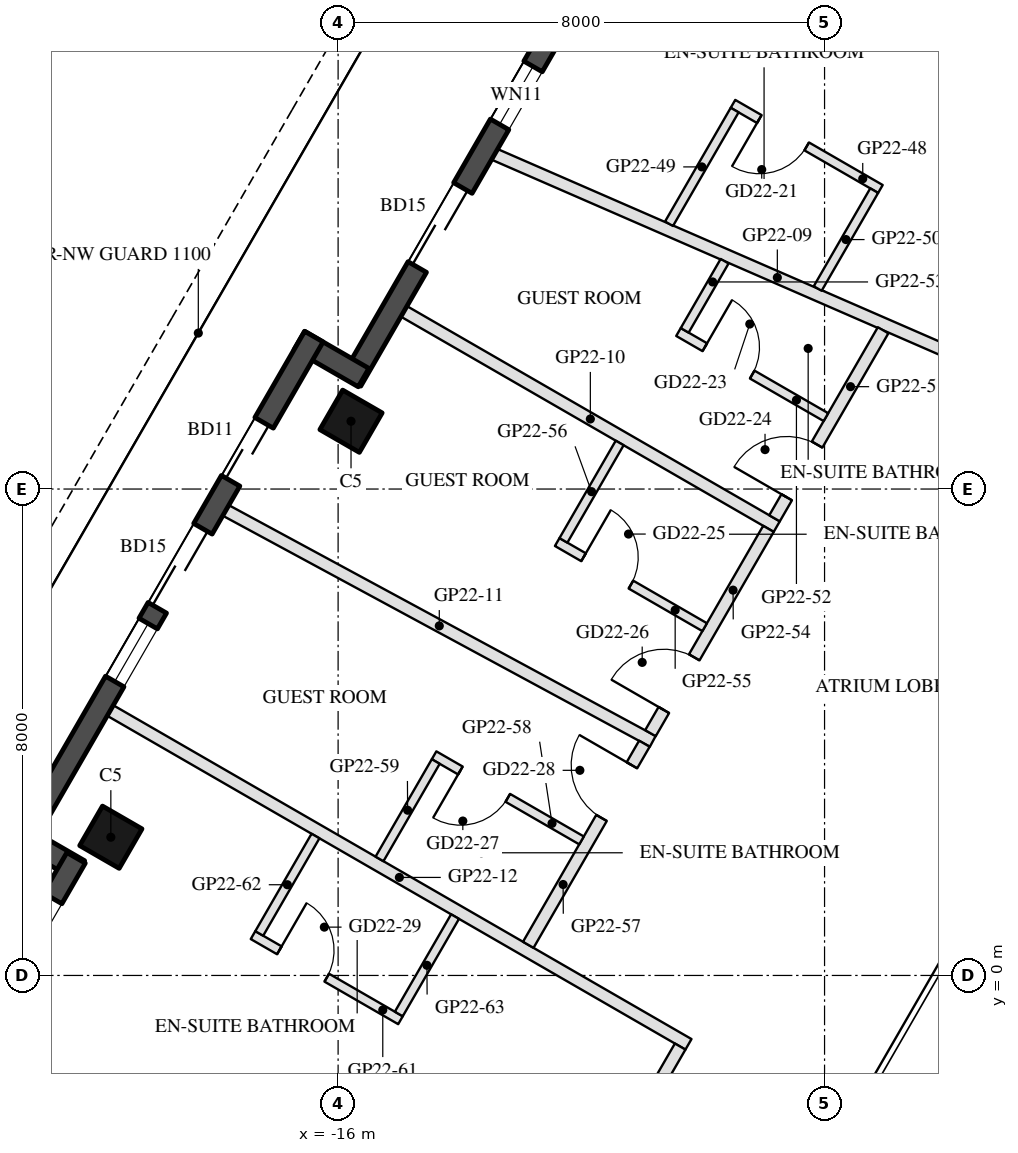
"""IFC4 building model, lengths in metres.
Left out: names, types, materials, properties, quantities, classifications, styles, units other than length and angle.
Written with IfcOpenShell. Run it as: python <this file> out.ifc"""

import sys

from ifc_helpers import new_model, si_unit, direction, frame, frame_2d, origin, origin_2d, place, context, subcontext, project, spatial, rectangle, hollow_rectangle, extrude, element, fill, save


model = new_model("IFC4")
c1 = context("Model", 3, precision=1e-05, world=origin(), true_north=direction((0.0, 1.0)))
c2 = subcontext(c1, "Body", "Model", "MODEL_VIEW")
j1 = project(units=[si_unit("LENGTHUNIT", "METRE"), si_unit("PLANEANGLEUNIT", "RADIAN")], contexts=[c1])
p1 = place(None, origin())
s1 = spatial("IfcSite", under=j1, at=p1, CompositionType="ELEMENT")
p2 = place(p1, origin())
s2 = spatial("IfcBuilding", under=s1, at=p2, CompositionType="ELEMENT")
p3 = place(p2, frame((0.0, 0.0, 224.3)))
s3 = spatial("IfcBuildingStorey", under=s2, at=p3, CompositionType="ELEMENT", Elevation=224.3)
for number, where, z_axis, x_axis in (
    (1, (-15.788, 9.115, 0.0), (0.0, 0.0, 1.0), (0.5, 0.866, 0.0)),
    (2, (-19.738, 2.273, 0.0), (0.0, 0.0, 1.0), (0.5, 0.866, 0.0)),
):
    element("IfcColumn", number, at=place(p3, frame(where, z_axis=z_axis, x_axis=x_axis)), inside=s3, PredefinedType="COLUMN", context=c2, shape_type="SweptSolid", body=[
        extrude(hollow_rectangle(XDim=0.75, YDim=0.75, WallThickness=0.035, at=origin_2d()), origin(), (0.0, 0.0, 1.0), 3.7),
    ])
p4 = place(p3, frame((-12.409, 15.617, 0.0), z_axis=(0.0, 0.0, 1.0), x_axis=(-0.500003597184, -0.866023326939, 0.0)))
e3 = element("IfcWall", 3, at=p4, inside=s3, PredefinedType="SOLIDWALL", context=c2, shape_type="SweptSolid", body=[
    extrude(rectangle(XDim=6.74, YDim=0.35, at=frame_2d((3.37, 0.0))), origin(), (0.0, 0.0, 1.0), 3.55),
])
p5 = place(p4, frame((0.77, 0.0, 0.3)))
e4 = element("IfcOpeningElement", 4, at=p5, cuts=e3, PredefinedType="OPENING", context=c2, shape_type="SweptSolid", body=[
    extrude(rectangle(XDim=1.1, YDim=2.65, at=frame_2d((0.55, 1.325))), frame((0.0, 0.185, 0.0), z_axis=(0.0, -1.0, 0.0), x_axis=(1.0, 0.0, 0.0)), (0.0, 0.0, 1.0), 0.37),
])
p6 = place(p4, frame((3.079, 0.0, 0.0)))
e5 = element("IfcOpeningElement", 5, at=p6, cuts=e3, PredefinedType="OPENING", context=c2, shape_type="SweptSolid", body=[
    extrude(rectangle(XDim=1.5, YDim=2.4, at=frame_2d((0.75, 1.2))), frame((0.0, 0.185, 0.0), z_axis=(0.0, -1.0, 0.0), x_axis=(1.0, 0.0, 0.0)), (0.0, 0.0, 1.0), 0.37),
])
p7 = place(p3, frame((-15.581, 9.833, 0.0), z_axis=(0.0, 0.0, 1.0), x_axis=(-0.866055662726, 0.499947586314, 0.0)))
e6 = element("IfcWall", 6, at=p7, inside=s3, PredefinedType="SOLIDWALL", context=c2, shape_type="SweptSolid", body=[
    extrude(rectangle(XDim=1.22, YDim=0.35, at=frame_2d((0.61, 0.0))), origin(), (0.0, 0.0, 1.0), 3.55),
])
p8 = place(p3, frame((-16.398, 10.507, 0.0), z_axis=(0.0, 0.0, 1.0), x_axis=(-0.499999142773, -0.866025898704, 0.0)))
e7 = element("IfcWall", 7, at=p8, inside=s3, PredefinedType="SOLIDWALL", context=c2, shape_type="SweptSolid", body=[
    extrude(rectangle(XDim=9.7, YDim=0.35, at=frame_2d((4.85, 0.0))), origin(), (0.0, 0.0, 1.0), 3.55),
])
p9 = place(p8, frame((1.638, 0.0, 0.0)))
e8 = element("IfcOpeningElement", 8, at=p9, cuts=e7, PredefinedType="OPENING", context=c2, shape_type="SweptSolid", body=[
    extrude(rectangle(XDim=1.1, YDim=2.4, at=frame_2d((0.55, 1.2))), frame((0.0, 0.185, 0.0), z_axis=(0.0, -1.0, 0.0), x_axis=(1.0, 0.0, 0.0)), (0.0, 0.0, 1.0), 0.37),
])
p10 = place(p8, frame((3.65, 0.0, 0.0)))
e9 = element("IfcOpeningElement", 9, at=p10, cuts=e7, PredefinedType="OPENING", context=c2, shape_type="SweptSolid", body=[
    extrude(rectangle(XDim=1.5, YDim=2.4, at=frame_2d((0.75, 1.2))), frame((0.0, 0.185, 0.0), z_axis=(0.0, -1.0, 0.0), x_axis=(1.0, 0.0, 0.0)), (0.0, 0.0, 1.0), 0.37),
])
p11 = place(p8, frame((5.45, 0.0, 0.3)))
e10 = element("IfcOpeningElement", 10, at=p11, cuts=e7, PredefinedType="OPENING", context=c2, shape_type="SweptSolid", body=[
    extrude(rectangle(XDim=1.1, YDim=2.65, at=frame_2d((0.55, 1.325))), frame((0.0, 0.185, 0.0), z_axis=(0.0, -1.0, 0.0), x_axis=(1.0, 0.0, 0.0)), (0.0, 0.0, 1.0), 0.37),
])
p12 = place(p3, frame((-21.312, 2.346, 0.0), z_axis=(0.0, 0.0, 1.0), x_axis=(0.866005645448, -0.500034220881, 0.0)))
e11 = element("IfcWall", 11, at=p12, inside=s3, PredefinedType="SOLIDWALL", context=c2, shape_type="SweptSolid", body=[
    extrude(rectangle(XDim=1.22, YDim=0.35, at=frame_2d((0.61, 0.0))), origin(), (0.0, 0.0, 1.0), 3.55),
])
p13 = place(p3, frame((-20.309, 1.934, 0.0), z_axis=(0.0, 0.0, 1.0), x_axis=(-0.499992114976, -0.866029956157, 0.0)))
e12 = element("IfcWall", 12, at=p13, inside=s3, PredefinedType="SOLIDWALL", context=c2, shape_type="SweptSolid", body=[
    extrude(rectangle(XDim=6.74, YDim=0.35, at=frame_2d((3.37, 0.0))), origin(), (0.0, 0.0, 1.0), 3.55),
])
p14 = place(p13, frame((4.02, 0.0, 0.0)))
e13 = element("IfcOpeningElement", 13, at=p14, cuts=e12, PredefinedType="OPENING", context=c2, shape_type="SweptSolid", body=[
    extrude(rectangle(XDim=2.4, YDim=2.4, at=frame_2d((1.2, 1.2))), frame((0.0, 0.185, 0.0), z_axis=(0.0, -1.0, 0.0), x_axis=(1.0, 0.0, 0.0)), (0.0, 0.0, 1.0), 0.37),
])
p15 = place(p13, frame((0.77, 0.0, 0.3)))
e14 = element("IfcOpeningElement", 14, at=p15, cuts=e12, PredefinedType="OPENING", context=c2, shape_type="SweptSolid", body=[
    extrude(rectangle(XDim=2.9, YDim=2.65, at=frame_2d((1.45, 1.325))), frame((0.0, 0.185, 0.0), z_axis=(0.0, -1.0, 0.0), x_axis=(1.0, 0.0, 0.0)), (0.0, 0.0, 1.0), 0.37),
])
p16 = place(p3, frame((-13.427, 13.504, 0.0), z_axis=(0.0, 0.0, 1.0), x_axis=(0.916759471343, -0.399439697204, 0.0)))
e15 = element("IfcWall", 15, at=p16, inside=s3, PredefinedType="PARTITIONING", context=c2, shape_type="SweptSolid", body=[
    extrude(rectangle(XDim=10.144, YDim=0.2, at=frame_2d((5.072, 0.0))), origin(), (0.0, 0.0, 1.0), 3.06),
])
p17 = place(p3, frame((-14.917, 10.922, 0.0), z_axis=(0.0, 0.0, 1.0), x_axis=(0.866019052629, -0.500011000363, 0.0)))
e16 = element("IfcWall", 16, at=p17, inside=s3, PredefinedType="PARTITIONING", context=c2, shape_type="SweptSolid", body=[
    extrude(rectangle(XDim=7.08, YDim=0.2, at=frame_2d((3.54, 0.0))), origin(), (0.0, 0.0, 1.0), 3.06),
])
p18 = place(p3, frame((-17.847, 7.648, 0.0), z_axis=(0.0, 0.0, 1.0), x_axis=(0.879604495132, -0.475705720109, 0.0)))
e17 = element("IfcWall", 17, at=p18, inside=s3, PredefinedType="PARTITIONING", context=c2, shape_type="SweptSolid", body=[
    extrude(rectangle(XDim=7.983, YDim=0.2, at=frame_2d((3.992, 0.0))), origin(), (0.0, 0.0, 1.0), 3.06),
])
p19 = place(p3, frame((-19.747, 4.357, 0.0), z_axis=(0.0, 0.0, 1.0), x_axis=(0.866027479907, -0.499996404033, 0.0)))
e18 = element("IfcWall", 18, at=p19, inside=s3, PredefinedType="PARTITIONING", context=c2, shape_type="SweptSolid", body=[
    extrude(rectangle(XDim=10.98, YDim=0.2, at=frame_2d((5.49, 0.0))), origin(), (0.0, 0.0, 1.0), 3.06),
])
p20 = place(p3, frame((-7.081, 12.935, 0.0), z_axis=(0.0, 0.0, 1.0), x_axis=(-0.866056369097, 0.49994636267, 0.0)))
e19 = element("IfcWall", 19, at=p20, inside=s3, PredefinedType="PARTITIONING", context=c2, shape_type="SweptSolid", body=[
    extrude(rectangle(XDim=2.8, YDim=0.15, at=frame_2d((1.4, 0.0))), origin(), (0.0, 0.0, 1.0), 3.55),
])
p21 = place(p20, frame((1.4, 0.0, 0.0)))
e20 = element("IfcOpeningElement", 20, at=p21, cuts=e19, PredefinedType="OPENING", context=c2, shape_type="SweptSolid", body=[
    extrude(rectangle(XDim=0.9, YDim=2.1, at=frame_2d((0.45, 1.05))), frame((0.0, 0.085, 0.0), z_axis=(0.0, -1.0, 0.0), x_axis=(1.0, 0.0, 0.0)), (0.0, 0.0, 1.0), 0.17),
])
p22 = place(p3, frame((-9.479, 14.233, 0.0), z_axis=(0.0, 0.0, 1.0), x_axis=(-0.499983569942, -0.866034889475, 0.0)))
e21 = element("IfcWall", 21, at=p22, inside=s3, PredefinedType="PARTITIONING", context=c2, shape_type="SweptSolid", body=[
    extrude(rectangle(XDim=2.158, YDim=0.15, at=frame_2d((1.079, 0.0))), origin(), (0.0, 0.0, 1.0), 3.55),
])
p23 = place(p3, frame((-7.184, 12.908, 0.0), z_axis=(0.0, 0.0, 1.0), x_axis=(-0.49995366312, -0.866052154742, 0.0)))
e22 = element("IfcWall", 22, at=p23, inside=s3, PredefinedType="PARTITIONING", context=c2, shape_type="SweptSolid", body=[
    extrude(rectangle(XDim=1.859, YDim=0.15, at=frame_2d((0.929, 0.0))), origin(), (0.0, 0.0, 1.0), 3.55),
])
p24 = place(p3, frame((-8.823, 7.519, 0.0), z_axis=(0.0, 0.0, 1.0), x_axis=(0.500036104519, 0.866004557827, 0.0)))
e23 = element("IfcWall", 23, at=p24, inside=s3, PredefinedType="PARTITIONING", context=c2, shape_type="SweptSolid", body=[
    extrude(rectangle(XDim=3.571, YDim=0.2, at=frame_2d((1.786, 0.0))), origin(), (0.0, 0.0, 1.0), 2.95),
])
p25 = place(p24, frame((0.4, 0.0, 0.0)))
e24 = element("IfcOpeningElement", 24, at=p25, cuts=e23, PredefinedType="OPENING", context=c2, shape_type="SweptSolid", body=[
    extrude(rectangle(XDim=1.0, YDim=2.1, at=frame_2d((0.5, 1.05))), frame((0.0, 0.11, 0.0), z_axis=(0.0, -1.0, 0.0), x_axis=(1.0, 0.0, 0.0)), (0.0, 0.0, 1.0), 0.22),
])
p26 = place(p3, frame((-10.402, 10.583, 0.0), z_axis=(0.0, 0.0, 1.0), x_axis=(0.866034573852, -0.49998411664, 0.0)))
e25 = element("IfcWall", 25, at=p26, inside=s3, PredefinedType="PARTITIONING", context=c2, shape_type="SweptSolid", body=[
    extrude(rectangle(XDim=2.8, YDim=0.15, at=frame_2d((1.4, 0.0))), origin(), (0.0, 0.0, 1.0), 2.95),
])
p27 = place(p26, frame((0.5, 0.0, 0.0)))
e26 = element("IfcOpeningElement", 26, at=p27, cuts=e25, PredefinedType="OPENING", context=c2, shape_type="SweptSolid", body=[
    extrude(rectangle(XDim=0.9, YDim=2.1, at=frame_2d((0.45, 1.05))), frame((0.0, 0.085, 0.0), z_axis=(0.0, -1.0, 0.0), x_axis=(1.0, 0.0, 0.0)), (0.0, 0.0, 1.0), 0.17),
])
p28 = place(p3, frame((-9.644, 11.747, 0.0), z_axis=(0.0, 0.0, 1.0), x_axis=(-0.499899541988, -0.866083395476, 0.0)))
e27 = element("IfcWall", 27, at=p28, inside=s3, PredefinedType="PARTITIONING", context=c2, shape_type="SweptSolid", body=[
    extrude(rectangle(XDim=1.313, YDim=0.15, at=frame_2d((0.656, 0.0))), origin(), (0.0, 0.0, 1.0), 2.95),
])
p29 = place(p3, frame((-10.863, 3.985, 0.0), z_axis=(0.0, 0.0, 1.0), x_axis=(0.500009256921, 0.866020059232, 0.0)))
e28 = element("IfcWall", 28, at=p29, inside=s3, PredefinedType="PARTITIONING", context=c2, shape_type="SweptSolid", body=[
    extrude(rectangle(XDim=3.881, YDim=0.2, at=frame_2d((1.94, 0.0))), origin(), (0.0, 0.0, 1.0), 2.95),
])
p30 = place(p29, frame((0.44, 0.0, 0.0)))
e29 = element("IfcOpeningElement", 29, at=p30, cuts=e28, PredefinedType="OPENING", context=c2, shape_type="SweptSolid", body=[
    extrude(rectangle(XDim=1.0, YDim=2.1, at=frame_2d((0.5, 1.05))), frame((0.0, 0.11, 0.0), z_axis=(0.0, -1.0, 0.0), x_axis=(1.0, 0.0, 0.0)), (0.0, 0.0, 1.0), 0.22),
])
p31 = place(p3, frame((-12.397, 7.128, 0.0), z_axis=(0.0, 0.0, 1.0), x_axis=(0.866018616679, -0.500011755427, 0.0)))
e30 = element("IfcWall", 30, at=p31, inside=s3, PredefinedType="PARTITIONING", context=c2, shape_type="SweptSolid", body=[
    extrude(rectangle(XDim=2.8, YDim=0.15, at=frame_2d((1.4, 0.0))), origin(), (0.0, 0.0, 1.0), 2.95),
])
p32 = place(p31, frame((0.5, 0.0, 0.0)))
e31 = element("IfcOpeningElement", 31, at=p32, cuts=e30, PredefinedType="OPENING", context=c2, shape_type="SweptSolid", body=[
    extrude(rectangle(XDim=0.9, YDim=2.1, at=frame_2d((0.45, 1.05))), frame((0.0, 0.085, 0.0), z_axis=(0.0, -1.0, 0.0), x_axis=(1.0, 0.0, 0.0)), (0.0, 0.0, 1.0), 0.17),
])
p33 = place(p3, frame((-11.369, 8.758, 0.0), z_axis=(0.0, 0.0, 1.0), x_axis=(-0.500042316284, -0.866000971088, 0.0)))
e32 = element("IfcWall", 32, at=p33, inside=s3, PredefinedType="PARTITIONING", context=c2, shape_type="SweptSolid", body=[
    extrude(rectangle(XDim=1.85, YDim=0.15, at=frame_2d((0.925, 0.0))), origin(), (0.0, 0.0, 1.0), 2.95),
])
p34 = place(p3, frame((-12.873, 0.504, 0.0), z_axis=(0.0, 0.0, 1.0), x_axis=(0.500030487836, 0.866007800909, 0.0)))
e33 = element("IfcWall", 33, at=p34, inside=s3, PredefinedType="PARTITIONING", context=c2, shape_type="SweptSolid", body=[
    extrude(rectangle(XDim=3.819, YDim=0.2, at=frame_2d((1.91, 0.0))), origin(), (0.0, 0.0, 1.0), 2.95),
])
p35 = place(p34, frame((2.41, 0.0, 0.0)))
e34 = element("IfcOpeningElement", 34, at=p35, cuts=e33, PredefinedType="OPENING", context=c2, shape_type="SweptSolid", body=[
    extrude(rectangle(XDim=1.0, YDim=2.1, at=frame_2d((0.5, 1.05))), frame((0.0, 0.11, 0.0), z_axis=(0.0, -1.0, 0.0), x_axis=(1.0, 0.0, 0.0)), (0.0, 0.0, 1.0), 0.22),
])
p36 = place(p3, frame((-11.997, 2.221, 0.0), z_axis=(0.0, 0.0, 1.0), x_axis=(-0.866034573852, 0.49998411664, 0.0)))
e35 = element("IfcWall", 35, at=p36, inside=s3, PredefinedType="PARTITIONING", context=c2, shape_type="SweptSolid", body=[
    extrude(rectangle(XDim=2.8, YDim=0.15, at=frame_2d((1.4, 0.0))), origin(), (0.0, 0.0, 1.0), 2.95),
])
p37 = place(p36, frame((1.4, 0.0, 0.0)))
e36 = element("IfcOpeningElement", 36, at=p37, cuts=e35, PredefinedType="OPENING", context=c2, shape_type="SweptSolid", body=[
    extrude(rectangle(XDim=0.9, YDim=2.1, at=frame_2d((0.45, 1.05))), frame((0.0, 0.085, 0.0), z_axis=(0.0, -1.0, 0.0), x_axis=(1.0, 0.0, 0.0)), (0.0, 0.0, 1.0), 0.17),
])
p38 = place(p3, frame((-14.394, 3.519, 0.0), z_axis=(0.0, 0.0, 1.0), x_axis=(-0.499886193382, -0.866091100096, 0.0)))
e37 = element("IfcWall", 37, at=p38, inside=s3, PredefinedType="PARTITIONING", context=c2, shape_type="SweptSolid", body=[
    extrude(rectangle(XDim=1.85, YDim=0.15, at=frame_2d((0.925, 0.0))), origin(), (0.0, 0.0, 1.0), 3.55),
])
p39 = place(p3, frame((-12.269, -4.45, 0.0), z_axis=(0.0, 0.0, 1.0), x_axis=(0.500055316652, 0.865993464345, 0.0)))
e38 = element("IfcWall", 38, at=p39, inside=s3, PredefinedType="PARTITIONING", context=c2, shape_type="SweptSolid", body=[
    extrude(rectangle(XDim=3.788, YDim=0.2, at=frame_2d((1.894, 0.0))), origin(), (0.0, 0.0, 1.0), 2.95),
])
p40 = place(p39, frame((1.394, 0.0, 0.0)))
e39 = element("IfcOpeningElement", 39, at=p40, cuts=e38, PredefinedType="OPENING", context=c2, shape_type="SweptSolid", body=[
    extrude(rectangle(XDim=1.0, YDim=2.1, at=frame_2d((0.5, 1.05))), frame((0.0, 0.11, 0.0), z_axis=(0.0, -1.0, 0.0), x_axis=(1.0, 0.0, 0.0)), (0.0, 0.0, 1.0), 0.22),
])
p41 = place(p3, frame((-17.399, 0.664, 0.0), z_axis=(0.0, 0.0, 1.0), x_axis=(0.866018616679, -0.500011755427, 0.0)))
e40 = element("IfcWall", 40, at=p41, inside=s3, PredefinedType="PARTITIONING", context=c2, shape_type="SweptSolid", body=[
    extrude(rectangle(XDim=2.8, YDim=0.15, at=frame_2d((1.4, 0.0))), origin(), (0.0, 0.0, 1.0), 3.55),
])
p42 = place(p41, frame((0.5, 0.0, 0.0)))
e41 = element("IfcOpeningElement", 41, at=p42, cuts=e40, PredefinedType="OPENING", context=c2, shape_type="SweptSolid", body=[
    extrude(rectangle(XDim=0.9, YDim=2.1, at=frame_2d((0.45, 1.05))), frame((0.0, 0.085, 0.0), z_axis=(0.0, -1.0, 0.0), x_axis=(1.0, 0.0, 0.0)), (0.0, 0.0, 1.0), 0.17),
])
p43 = place(p3, frame((-16.372, 2.293, 0.0), z_axis=(0.0, 0.0, 1.0), x_axis=(-0.499985172903, -0.866033964044, 0.0)))
e42 = element("IfcWall", 42, at=p43, inside=s3, PredefinedType="PARTITIONING", context=c2, shape_type="SweptSolid", body=[
    extrude(rectangle(XDim=1.85, YDim=0.15, at=frame_2d((0.925, 0.0))), origin(), (0.0, 0.0, 1.0), 2.95),
])
p44 = place(p3, frame((-14.077, 0.968, 0.0), z_axis=(0.0, 0.0, 1.0), x_axis=(-0.500042316284, -0.866000971088, 0.0)))
e43 = element("IfcWall", 43, at=p44, inside=s3, PredefinedType="PARTITIONING", context=c2, shape_type="SweptSolid", body=[
    extrude(rectangle(XDim=1.85, YDim=0.15, at=frame_2d((0.925, 0.0))), origin(), (0.0, 0.0, 1.0), 2.95),
])
p45 = place(p5, origin())
e44 = element("IfcWindow", 44, at=p45, inside=s3, PartitioningType="SINGLE_PANEL", PredefinedType="WINDOW", context=c2, shape_type="SweptSolid", body=[
    extrude(rectangle(XDim=1.1, YDim=2.65, at=frame_2d((0.55, 1.325))), frame((0.0, 0.03, 0.0), z_axis=(0.0, -1.0, 0.0), x_axis=(1.0, 0.0, 0.0)), (0.0, 0.0, 1.0), 0.06),
])
fill(e4, e44)
p46 = place(p6, frame((1.5, 0.0, 0.0), z_axis=(0.0, 0.0, 1.0), x_axis=(-1.0, 0.0, 0.0)))
e45 = element("IfcDoor", 45, at=p46, inside=s3, OperationType="SLIDING_TO_LEFT", PredefinedType="DOOR", context=c2, shape_type="SweptSolid", body=[
    extrude(rectangle(XDim=1.5, YDim=2.4, at=frame_2d((0.75, 1.2))), frame((0.0, 0.025, 0.0), z_axis=(0.0, -1.0, 0.0), x_axis=(1.0, 0.0, 0.0)), (0.0, 0.0, 1.0), 0.05),
])
fill(e5, e45)
p47 = place(p9, frame((1.1, 0.0, 0.0), z_axis=(0.0, 0.0, 1.0), x_axis=(-1.0, 0.0, 0.0)))
e46 = element("IfcDoor", 46, at=p47, inside=s3, OperationType="SLIDING_TO_LEFT", PredefinedType="DOOR", context=c2, shape_type="SweptSolid", body=[
    extrude(rectangle(XDim=1.1, YDim=2.4, at=frame_2d((0.55, 1.2))), frame((0.0, 0.025, 0.0), z_axis=(0.0, -1.0, 0.0), x_axis=(1.0, 0.0, 0.0)), (0.0, 0.0, 1.0), 0.05),
])
fill(e8, e46)
p48 = place(p10, frame((1.5, 0.0, 0.0), z_axis=(0.0, 0.0, 1.0), x_axis=(-1.0, 0.0, 0.0)))
e47 = element("IfcDoor", 47, at=p48, inside=s3, OperationType="SLIDING_TO_LEFT", PredefinedType="DOOR", context=c2, shape_type="SweptSolid", body=[
    extrude(rectangle(XDim=1.5, YDim=2.4, at=frame_2d((0.75, 1.2))), frame((0.0, 0.025, 0.0), z_axis=(0.0, -1.0, 0.0), x_axis=(1.0, 0.0, 0.0)), (0.0, 0.0, 1.0), 0.05),
])
fill(e9, e47)
p49 = place(p11, origin())
e48 = element("IfcWindow", 48, at=p49, inside=s3, PartitioningType="SINGLE_PANEL", PredefinedType="WINDOW", context=c2, shape_type="SweptSolid", body=[
    extrude(rectangle(XDim=1.1, YDim=2.65, at=frame_2d((0.55, 1.325))), frame((0.0, 0.03, 0.0), z_axis=(0.0, -1.0, 0.0), x_axis=(1.0, 0.0, 0.0)), (0.0, 0.0, 1.0), 0.06),
])
fill(e10, e48)
p50 = place(p15, origin())
e49 = element("IfcWindow", 49, at=p50, inside=s3, PartitioningType="SINGLE_PANEL", PredefinedType="WINDOW", context=c2, shape_type="SweptSolid", body=[
    extrude(rectangle(XDim=2.9, YDim=2.65, at=frame_2d((1.45, 1.325))), frame((0.0, 0.03, 0.0), z_axis=(0.0, -1.0, 0.0), x_axis=(1.0, 0.0, 0.0)), (0.0, 0.0, 1.0), 0.06),
])
fill(e14, e49)
p51 = place(p21, origin())
e50 = element("IfcDoor", 50, at=p51, inside=s3, OperationType="SINGLE_SWING_RIGHT", PredefinedType="DOOR", context=c2, shape_type="SweptSolid", body=[
    extrude(rectangle(XDim=0.9, YDim=2.1, at=frame_2d((0.45, 1.05))), frame((0.0, 0.025, 0.0), z_axis=(0.0, -1.0, 0.0), x_axis=(1.0, 0.0, 0.0)), (0.0, 0.0, 1.0), 0.05),
])
fill(e20, e50)
p52 = place(p27, origin())
e51 = element("IfcDoor", 51, at=p52, inside=s3, OperationType="SINGLE_SWING_LEFT", PredefinedType="DOOR", context=c2, shape_type="SweptSolid", body=[
    extrude(rectangle(XDim=0.9, YDim=2.1, at=frame_2d((0.45, 1.05))), frame((0.0, 0.025, 0.0), z_axis=(0.0, -1.0, 0.0), x_axis=(1.0, 0.0, 0.0)), (0.0, 0.0, 1.0), 0.05),
])
fill(e26, e51)
p53 = place(p25, origin())
e52 = element("IfcDoor", 52, at=p53, inside=s3, OperationType="SINGLE_SWING_LEFT", PredefinedType="DOOR", context=c2, shape_type="SweptSolid", body=[
    extrude(rectangle(XDim=1.0, YDim=2.1, at=frame_2d((0.5, 1.05))), frame((0.0, 0.025, 0.0), z_axis=(0.0, -1.0, 0.0), x_axis=(1.0, 0.0, 0.0)), (0.0, 0.0, 1.0), 0.05),
])
fill(e24, e52)
p54 = place(p32, origin())
e53 = element("IfcDoor", 53, at=p54, inside=s3, OperationType="SINGLE_SWING_LEFT", PredefinedType="DOOR", context=c2, shape_type="SweptSolid", body=[
    extrude(rectangle(XDim=0.9, YDim=2.1, at=frame_2d((0.45, 1.05))), frame((0.0, 0.025, 0.0), z_axis=(0.0, -1.0, 0.0), x_axis=(1.0, 0.0, 0.0)), (0.0, 0.0, 1.0), 0.05),
])
fill(e31, e53)
p55 = place(p30, origin())
e54 = element("IfcDoor", 54, at=p55, inside=s3, OperationType="SINGLE_SWING_LEFT", PredefinedType="DOOR", context=c2, shape_type="SweptSolid", body=[
    extrude(rectangle(XDim=1.0, YDim=2.1, at=frame_2d((0.5, 1.05))), frame((0.0, 0.025, 0.0), z_axis=(0.0, -1.0, 0.0), x_axis=(1.0, 0.0, 0.0)), (0.0, 0.0, 1.0), 0.05),
])
fill(e29, e54)
p56 = place(p37, origin())
e55 = element("IfcDoor", 55, at=p56, inside=s3, OperationType="SINGLE_SWING_RIGHT", PredefinedType="DOOR", context=c2, shape_type="SweptSolid", body=[
    extrude(rectangle(XDim=0.9, YDim=2.1, at=frame_2d((0.45, 1.05))), frame((0.0, 0.025, 0.0), z_axis=(0.0, -1.0, 0.0), x_axis=(1.0, 0.0, 0.0)), (0.0, 0.0, 1.0), 0.05),
])
fill(e36, e55)
p57 = place(p35, origin())
e56 = element("IfcDoor", 56, at=p57, inside=s3, OperationType="SINGLE_SWING_RIGHT", PredefinedType="DOOR", context=c2, shape_type="SweptSolid", body=[
    extrude(rectangle(XDim=1.0, YDim=2.1, at=frame_2d((0.5, 1.05))), frame((0.0, 0.025, 0.0), z_axis=(0.0, -1.0, 0.0), x_axis=(1.0, 0.0, 0.0)), (0.0, 0.0, 1.0), 0.05),
])
fill(e34, e56)
p58 = place(p42, origin())
e57 = element("IfcDoor", 57, at=p58, inside=s3, OperationType="SINGLE_SWING_LEFT", PredefinedType="DOOR", context=c2, shape_type="SweptSolid", body=[
    extrude(rectangle(XDim=0.9, YDim=2.1, at=frame_2d((0.45, 1.05))), frame((0.0, 0.025, 0.0), z_axis=(0.0, -1.0, 0.0), x_axis=(1.0, 0.0, 0.0)), (0.0, 0.0, 1.0), 0.05),
])
fill(e41, e57)
save(model, sys.argv[1])
